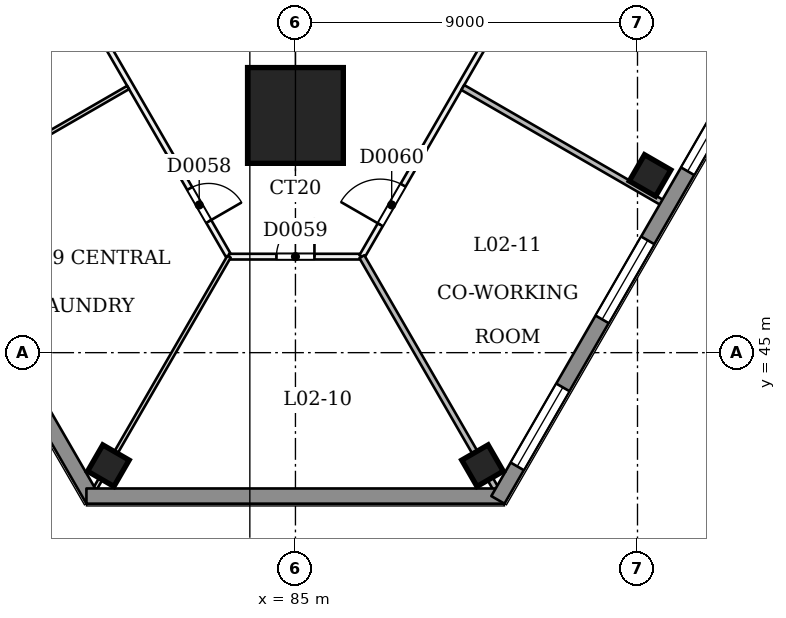
"""IFC4 building model, lengths in metres.
Left out: names, types, materials, properties, quantities, classifications, styles, units other than length and angle.
Written with IfcOpenShell. Run it as: python <this file> out.ifc"""

import sys

from ifc_helpers import new_model, si_unit, direction, frame, frame_2d, origin, origin_2d, place, context, subcontext, project, spatial, rectangle, extrude, element, fill, save


model = new_model("IFC4")
c1 = context("Model", 3, precision=1e-05, world=origin(), true_north=direction((0.0, 1.0)))
c2 = subcontext(c1, "Body", "Model", "MODEL_VIEW")
j1 = project(units=[si_unit("LENGTHUNIT", "METRE"), si_unit("PLANEANGLEUNIT", "RADIAN")], contexts=[c1])
p1 = place(None, origin())
s1 = spatial("IfcSite", under=j1, at=p1, CompositionType="ELEMENT")
p2 = place(p1, origin())
s2 = spatial("IfcBuilding", under=s1, at=p2, CompositionType="ELEMENT")
p3 = place(p2, frame((0.0, 0.0, 13.5)))
s3 = spatial("IfcBuildingStorey", under=s2, at=p3, CompositionType="ELEMENT", Elevation=13.5)
p4 = place(p3, frame((85.0, 51.171, 0.0), z_axis=(0.0, 0.058331497301, 0.998297268564), x_axis=(-1.0, 0.0, 0.0)))
e1 = element("IfcColumn", 1, at=p4, inside=s3, PredefinedType="COLUMN", context=c2, shape_type="SweptSolid", body=[
    extrude(rectangle(XDim=2.52, YDim=2.52, at=origin_2d()), origin(), (0.0, 0.0, 1.0), 4.508),
])
for number, where, z_axis, x_axis in (
    (2, (80.077, 42.026, 0.0), (0.0, 0.0, 1.0), (0.5, 0.866, 0.0)),
    (3, (89.923, 42.026, 0.0), (0.0, 0.0, 1.0), (0.866, 0.5, 0.0)),
    (4, (94.331, 49.662, 0.0), (0.0, 0.0, 1.0), (0.5, 0.866, 0.0)),
):
    element("IfcColumn", number, at=place(p3, frame(where, z_axis=z_axis, x_axis=x_axis)), inside=s3, PredefinedType="COLUMN", context=c2, shape_type="SweptSolid", body=[
        extrude(rectangle(XDim=0.8, YDim=0.8, at=origin_2d()), origin(), (0.0, 0.0, 1.0), 4.5),
    ])
p5 = place(p3, frame((55.57, 95.474, 0.0), z_axis=(0.0, 0.0, 1.0), x_axis=(0.500000085768, -0.866025354266, 0.0)))
e5 = element("IfcWall", 5, at=p5, inside=s3, PredefinedType="PARTITIONING", context=c2, shape_type="SweptSolid", body=[
    extrude(rectangle(XDim=55.365, YDim=0.15, at=frame_2d((27.682, 0.0))), origin(), (0.0, 0.0, 1.0), 4.05),
])
p6 = place(p5, frame((6.832, 0.0, 0.0)))
e6 = element("IfcOpeningElement", 6, at=p6, cuts=e5, PredefinedType="OPENING", context=c2, shape_type="SweptSolid", body=[
    extrude(rectangle(XDim=1.2, YDim=2.1, at=frame_2d((0.6, 1.05))), frame((0.0, 0.085, 0.0), z_axis=(0.0, -1.0, 0.0), x_axis=(1.0, 0.0, 0.0)), (0.0, 0.0, 1.0), 0.171),
])
p7 = place(p5, frame((14.626, 0.0, 0.0)))
e7 = element("IfcOpeningElement", 7, at=p7, cuts=e5, PredefinedType="OPENING", context=c2, shape_type="SweptSolid", body=[
    extrude(rectangle(XDim=0.9, YDim=2.1, at=frame_2d((0.45, 1.05))), frame((0.0, 0.085, 0.0), z_axis=(0.0, -1.0, 0.0), x_axis=(1.0, 0.0, 0.0)), (0.0, 0.0, 1.0), 0.171),
])
p8 = place(p5, frame((16.876, 0.0, 0.0)))
e8 = element("IfcOpeningElement", 8, at=p8, cuts=e5, PredefinedType="OPENING", context=c2, shape_type="SweptSolid", body=[
    extrude(rectangle(XDim=0.9, YDim=2.1, at=frame_2d((0.45, 1.05))), frame((0.0, 0.085, 0.0), z_axis=(0.0, -1.0, 0.0), x_axis=(1.0, 0.0, 0.0)), (0.0, 0.0, 1.0), 0.171),
])
p9 = place(p5, frame((24.832, 0.0, 0.0)))
e9 = element("IfcOpeningElement", 9, at=p9, cuts=e5, PredefinedType="OPENING", context=c2, shape_type="SweptSolid", body=[
    extrude(rectangle(XDim=1.2, YDim=2.1, at=frame_2d((0.6, 1.05))), frame((0.0, 0.085, 0.0), z_axis=(0.0, -1.0, 0.0), x_axis=(1.0, 0.0, 0.0)), (0.0, 0.0, 1.0), 0.171),
])
p10 = place(p5, frame((36.082, 0.0, 0.0)))
e10 = element("IfcOpeningElement", 10, at=p10, cuts=e5, PredefinedType="OPENING", context=c2, shape_type="SweptSolid", body=[
    extrude(rectangle(XDim=1.2, YDim=2.1, at=frame_2d((0.6, 1.05))), frame((0.0, 0.085, 0.0), z_axis=(0.0, -1.0, 0.0), x_axis=(1.0, 0.0, 0.0)), (0.0, 0.0, 1.0), 0.171),
])
p11 = place(p5, frame((45.082, 0.0, 0.0)))
e11 = element("IfcOpeningElement", 11, at=p11, cuts=e5, PredefinedType="OPENING", context=c2, shape_type="SweptSolid", body=[
    extrude(rectangle(XDim=1.2, YDim=2.1, at=frame_2d((0.6, 1.05))), frame((0.0, 0.085, 0.0), z_axis=(0.0, -1.0, 0.0), x_axis=(1.0, 0.0, 0.0)), (0.0, 0.0, 1.0), 0.171),
])
p12 = place(p5, frame((53.295, 0.0, 0.0)))
e12 = element("IfcOpeningElement", 12, at=p12, cuts=e5, PredefinedType="OPENING", context=c2, shape_type="SweptSolid", body=[
    extrude(rectangle(XDim=1.0, YDim=2.1, at=frame_2d((0.5, 1.05))), frame((0.0, 0.085, 0.0), z_axis=(0.0, -1.0, 0.0), x_axis=(1.0, 0.0, 0.0)), (0.0, 0.0, 1.0), 0.171),
])
p13 = place(p3, frame((83.253, 47.526, 0.0), z_axis=(0.0, 0.0, 1.0), x_axis=(1.0, 0.0, 0.0)))
e13 = element("IfcWall", 13, at=p13, inside=s3, PredefinedType="PARTITIONING", context=c2, shape_type="SweptSolid", body=[
    extrude(rectangle(XDim=3.495, YDim=0.15, at=frame_2d((1.747, 0.0))), origin(), (0.0, 0.0, 1.0), 4.05),
])
p14 = place(p13, frame((1.247, 0.0, 0.0)))
e14 = element("IfcOpeningElement", 14, at=p14, cuts=e13, PredefinedType="OPENING", context=c2, shape_type="SweptSolid", body=[
    extrude(rectangle(XDim=1.0, YDim=2.1, at=frame_2d((0.5, 1.05))), frame((0.0, 0.085, 0.0), z_axis=(0.0, -1.0, 0.0), x_axis=(1.0, 0.0, 0.0)), (0.0, 0.0, 1.0), 0.171),
])
p15 = place(p3, frame((86.747, 47.526, 0.0), z_axis=(0.0, 0.0, 1.0), x_axis=(0.500000085768, 0.866025354266, 0.0)))
e15 = element("IfcWall", 15, at=p15, inside=s3, PredefinedType="PARTITIONING", context=c2, shape_type="SweptSolid", body=[
    extrude(rectangle(XDim=55.365, YDim=0.15, at=frame_2d((27.682, 0.0))), origin(), (0.0, 0.0, 1.0), 4.05),
])
p16 = place(p15, frame((0.97, 0.0, 0.0)))
e16 = element("IfcOpeningElement", 16, at=p16, cuts=e15, PredefinedType="OPENING", context=c2, shape_type="SweptSolid", body=[
    extrude(rectangle(XDim=1.2, YDim=2.1, at=frame_2d((0.6, 1.05))), frame((0.0, 0.085, 0.0), z_axis=(0.0, -1.0, 0.0), x_axis=(1.0, 0.0, 0.0)), (0.0, 0.0, 1.0), 0.171),
])
p17 = place(p15, frame((11.332, 0.0, 0.0)))
e17 = element("IfcOpeningElement", 17, at=p17, cuts=e15, PredefinedType="OPENING", context=c2, shape_type="SweptSolid", body=[
    extrude(rectangle(XDim=1.2, YDim=2.1, at=frame_2d((0.6, 1.05))), frame((0.0, 0.085, 0.0), z_axis=(0.0, -1.0, 0.0), x_axis=(1.0, 0.0, 0.0)), (0.0, 0.0, 1.0), 0.171),
])
p18 = place(p15, frame((29.332, 0.0, 0.0)))
e18 = element("IfcOpeningElement", 18, at=p18, cuts=e15, PredefinedType="OPENING", context=c2, shape_type="SweptSolid", body=[
    extrude(rectangle(XDim=1.2, YDim=2.1, at=frame_2d((0.6, 1.05))), frame((0.0, 0.085, 0.0), z_axis=(0.0, -1.0, 0.0), x_axis=(1.0, 0.0, 0.0)), (0.0, 0.0, 1.0), 0.171),
])
p19 = place(p15, frame((42.132, 0.0, 0.0)))
e19 = element("IfcOpeningElement", 19, at=p19, cuts=e15, PredefinedType="OPENING", context=c2, shape_type="SweptSolid", body=[
    extrude(rectangle(XDim=1.2, YDim=2.1, at=frame_2d((0.6, 1.05))), frame((0.0, 0.085, 0.0), z_axis=(0.0, -1.0, 0.0), x_axis=(1.0, 0.0, 0.0)), (0.0, 0.0, 1.0), 0.171),
])
p20 = place(p15, frame((46.569, 0.0, 0.0)))
e20 = element("IfcOpeningElement", 20, at=p20, cuts=e15, PredefinedType="OPENING", context=c2, shape_type="SweptSolid", body=[
    extrude(rectangle(XDim=1.0, YDim=2.1, at=frame_2d((0.5, 1.05))), frame((0.0, 0.085, 0.0), z_axis=(0.0, -1.0, 0.0), x_axis=(1.0, 0.0, 0.0)), (0.0, 0.0, 1.0), 0.171),
])
p21 = place(p15, frame((48.819, 0.0, 0.0)))
e21 = element("IfcOpeningElement", 21, at=p21, cuts=e15, PredefinedType="OPENING", context=c2, shape_type="SweptSolid", body=[
    extrude(rectangle(XDim=1.0, YDim=2.1, at=frame_2d((0.5, 1.05))), frame((0.0, 0.085, 0.0), z_axis=(0.0, -1.0, 0.0), x_axis=(1.0, 0.0, 0.0)), (0.0, 0.0, 1.0), 0.171),
])
p22 = place(p15, frame((51.837, 0.0, 0.0)))
e22 = element("IfcOpeningElement", 22, at=p22, cuts=e15, PredefinedType="OPENING", context=c2, shape_type="SweptSolid", body=[
    extrude(rectangle(XDim=1.2, YDim=2.1, at=frame_2d((0.6, 1.05))), frame((0.0, 0.085, 0.0), z_axis=(0.0, -1.0, 0.0), x_axis=(1.0, 0.0, 0.0)), (0.0, 0.0, 1.0), 0.171),
])
p23 = place(p3, frame((75.119, 48.814, 0.0), z_axis=(0.0, 0.0, 1.0), x_axis=(0.866025537322, 0.499999768706, 0.0)))
e23 = element("IfcWall", 23, at=p23, inside=s3, PredefinedType="PARTITIONING", context=c2, shape_type="SweptSolid", body=[
    extrude(rectangle(XDim=6.325, YDim=0.1, at=frame_2d((3.163, 0.0))), origin(), (0.0, 0.0, 1.0), 4.05),
])
p24 = place(p3, frame((79.558, 41.126, 0.0), z_axis=(0.0, 0.0, 1.0), x_axis=(0.499969342782, 0.866043103014, 0.0)))
e24 = element("IfcWall", 24, at=p24, inside=s3, PredefinedType="PARTITIONING", context=c2, shape_type="SweptSolid", body=[
    extrude(rectangle(XDim=7.39, YDim=0.1, at=frame_2d((3.695, 0.0))), origin(), (0.0, 0.0, 1.0), 4.05),
])
p25 = place(p3, frame((90.442, 41.126, 0.0), z_axis=(0.0, 0.0, 1.0), x_axis=(-0.499994120305, 0.866028798401, 0.0)))
e25 = element("IfcWall", 25, at=p25, inside=s3, PredefinedType="PARTITIONING", context=c2, shape_type="SweptSolid", body=[
    extrude(rectangle(XDim=7.39, YDim=0.15, at=frame_2d((3.695, 0.0))), origin(), (0.0, 0.0, 1.0), 4.05),
])
p26 = place(p3, frame((94.881, 48.814, 0.0), z_axis=(0.0, 0.0, 1.0), x_axis=(-0.866042250622, 0.499970819286, 0.0)))
e26 = element("IfcWall", 26, at=p26, inside=s3, PredefinedType="PARTITIONING", context=c2, shape_type="SweptSolid", body=[
    extrude(rectangle(XDim=6.325, YDim=0.15, at=frame_2d((3.163, 0.0))), origin(), (0.0, 0.0, 1.0), 4.05),
])
p27 = place(p3, frame((79.673, 41.126, 0.0), z_axis=(0.0, 0.0, 1.0), x_axis=(-0.499997306052, 0.866026959131, 0.0)))
e27 = element("IfcWall", 27, at=p27, inside=s3, PredefinedType="SOLIDWALL", context=c2, shape_type="SweptSolid", body=[
    extrude(rectangle(XDim=62.87, YDim=0.4, at=frame_2d((31.435, 0.0))), origin(), (0.0, 0.0, 1.0), 4.05),
])
p28 = place(p27, frame((54.986, 0.0, 0.9)))
e28 = element("IfcOpeningElement", 28, at=p28, cuts=e27, PredefinedType="OPENING", context=c2, shape_type="SweptSolid", body=[
    extrude(rectangle(XDim=2.4, YDim=1.5, at=frame_2d((1.2, 0.75))), frame((0.0, 0.21, 0.0), z_axis=(0.0, -1.0, 0.0), x_axis=(1.0, 0.0, 0.0)), (0.0, 0.0, 1.0), 0.421),
])
p29 = place(p27, frame((50.486, 0.0, 0.9)))
e29 = element("IfcOpeningElement", 29, at=p29, cuts=e27, PredefinedType="OPENING", context=c2, shape_type="SweptSolid", body=[
    extrude(rectangle(XDim=2.4, YDim=1.5, at=frame_2d((1.2, 0.75))), frame((0.0, 0.21, 0.0), z_axis=(0.0, -1.0, 0.0), x_axis=(1.0, 0.0, 0.0)), (0.0, 0.0, 1.0), 0.421),
])
p30 = place(p27, frame((45.986, 0.0, 0.9)))
e30 = element("IfcOpeningElement", 30, at=p30, cuts=e27, PredefinedType="OPENING", context=c2, shape_type="SweptSolid", body=[
    extrude(rectangle(XDim=2.4, YDim=1.5, at=frame_2d((1.2, 0.75))), frame((0.0, 0.21, 0.0), z_axis=(0.0, -1.0, 0.0), x_axis=(1.0, 0.0, 0.0)), (0.0, 0.0, 1.0), 0.421),
])
p31 = place(p27, frame((32.486, 0.0, 0.9)))
e31 = element("IfcOpeningElement", 31, at=p31, cuts=e27, PredefinedType="OPENING", context=c2, shape_type="SweptSolid", body=[
    extrude(rectangle(XDim=2.4, YDim=1.5, at=frame_2d((1.2, 0.75))), frame((0.0, 0.21, 0.0), z_axis=(0.0, -1.0, 0.0), x_axis=(1.0, 0.0, 0.0)), (0.0, 0.0, 1.0), 0.421),
])
p32 = place(p27, frame((27.986, 0.0, 0.9)))
e32 = element("IfcOpeningElement", 32, at=p32, cuts=e27, PredefinedType="OPENING", context=c2, shape_type="SweptSolid", body=[
    extrude(rectangle(XDim=2.4, YDim=1.5, at=frame_2d((1.2, 0.75))), frame((0.0, 0.21, 0.0), z_axis=(0.0, -1.0, 0.0), x_axis=(1.0, 0.0, 0.0)), (0.0, 0.0, 1.0), 0.421),
])
p33 = place(p27, frame((23.486, 0.0, 0.9)))
e33 = element("IfcOpeningElement", 33, at=p33, cuts=e27, PredefinedType="OPENING", context=c2, shape_type="SweptSolid", body=[
    extrude(rectangle(XDim=2.4, YDim=1.5, at=frame_2d((1.2, 0.75))), frame((0.0, 0.21, 0.0), z_axis=(0.0, -1.0, 0.0), x_axis=(1.0, 0.0, 0.0)), (0.0, 0.0, 1.0), 0.421),
])
p34 = place(p27, frame((18.986, 0.0, 0.9)))
e34 = element("IfcOpeningElement", 34, at=p34, cuts=e27, PredefinedType="OPENING", context=c2, shape_type="SweptSolid", body=[
    extrude(rectangle(XDim=2.4, YDim=1.5, at=frame_2d((1.2, 0.75))), frame((0.0, 0.21, 0.0), z_axis=(0.0, -1.0, 0.0), x_axis=(1.0, 0.0, 0.0)), (0.0, 0.0, 1.0), 0.421),
])
p35 = place(p27, frame((14.486, 0.0, 0.9)))
e35 = element("IfcOpeningElement", 35, at=p35, cuts=e27, PredefinedType="OPENING", context=c2, shape_type="SweptSolid", body=[
    extrude(rectangle(XDim=2.4, YDim=1.5, at=frame_2d((1.2, 0.75))), frame((0.0, 0.21, 0.0), z_axis=(0.0, -1.0, 0.0), x_axis=(1.0, 0.0, 0.0)), (0.0, 0.0, 1.0), 0.421),
])
p36 = place(p3, frame((90.5, 41.226, 0.0), z_axis=(0.0, 0.0, 1.0), x_axis=(-1.0, 0.0, 0.0)))
e36 = element("IfcWall", 36, at=p36, inside=s3, PredefinedType="SOLIDWALL", context=c2, shape_type="SweptSolid", body=[
    extrude(rectangle(XDim=11.0, YDim=0.4, at=frame_2d((5.5, 0.0))), origin(), (0.0, 0.0, 1.0), 4.05),
])
p37 = place(p3, frame((121.762, 95.574, 0.0), z_axis=(0.0, 0.0, 1.0), x_axis=(-0.499997306052, -0.866026959131, 0.0)))
e37 = element("IfcWall", 37, at=p37, inside=s3, PredefinedType="SOLIDWALL", context=c2, shape_type="SweptSolid", body=[
    extrude(rectangle(XDim=62.87, YDim=0.4, at=frame_2d((31.435, 0.0))), origin(), (0.0, 0.0, 1.0), 4.05),
])
p38 = place(p37, frame((59.452, 0.0, 0.9)))
e38 = element("IfcOpeningElement", 38, at=p38, cuts=e37, PredefinedType="OPENING", context=c2, shape_type="SweptSolid", body=[
    extrude(rectangle(XDim=2.4, YDim=1.5, at=frame_2d((1.2, 0.75))), frame((0.0, 0.21, 0.0), z_axis=(0.0, -1.0, 0.0), x_axis=(1.0, 0.0, 0.0)), (0.0, 0.0, 1.0), 0.421),
])
p39 = place(p37, frame((54.986, 0.0, 0.9)))
e39 = element("IfcOpeningElement", 39, at=p39, cuts=e37, PredefinedType="OPENING", context=c2, shape_type="SweptSolid", body=[
    extrude(rectangle(XDim=2.4, YDim=1.5, at=frame_2d((1.2, 0.75))), frame((0.0, 0.21, 0.0), z_axis=(0.0, -1.0, 0.0), x_axis=(1.0, 0.0, 0.0)), (0.0, 0.0, 1.0), 0.421),
])
p40 = place(p37, frame((50.486, 0.0, 0.9)))
e40 = element("IfcOpeningElement", 40, at=p40, cuts=e37, PredefinedType="OPENING", context=c2, shape_type="SweptSolid", body=[
    extrude(rectangle(XDim=2.4, YDim=1.5, at=frame_2d((1.2, 0.75))), frame((0.0, 0.21, 0.0), z_axis=(0.0, -1.0, 0.0), x_axis=(1.0, 0.0, 0.0)), (0.0, 0.0, 1.0), 0.421),
])
p41 = place(p37, frame((45.986, 0.0, 0.9)))
e41 = element("IfcOpeningElement", 41, at=p41, cuts=e37, PredefinedType="OPENING", context=c2, shape_type="SweptSolid", body=[
    extrude(rectangle(XDim=2.4, YDim=1.5, at=frame_2d((1.2, 0.75))), frame((0.0, 0.21, 0.0), z_axis=(0.0, -1.0, 0.0), x_axis=(1.0, 0.0, 0.0)), (0.0, 0.0, 1.0), 0.421),
])
p42 = place(p37, frame((41.486, 0.0, 0.9)))
e42 = element("IfcOpeningElement", 42, at=p42, cuts=e37, PredefinedType="OPENING", context=c2, shape_type="SweptSolid", body=[
    extrude(rectangle(XDim=2.4, YDim=1.5, at=frame_2d((1.2, 0.75))), frame((0.0, 0.21, 0.0), z_axis=(0.0, -1.0, 0.0), x_axis=(1.0, 0.0, 0.0)), (0.0, 0.0, 1.0), 0.421),
])
p43 = place(p37, frame((36.986, 0.0, 0.9)))
e43 = element("IfcOpeningElement", 43, at=p43, cuts=e37, PredefinedType="OPENING", context=c2, shape_type="SweptSolid", body=[
    extrude(rectangle(XDim=2.4, YDim=1.5, at=frame_2d((1.2, 0.75))), frame((0.0, 0.21, 0.0), z_axis=(0.0, -1.0, 0.0), x_axis=(1.0, 0.0, 0.0)), (0.0, 0.0, 1.0), 0.421),
])
p44 = place(p37, frame((23.486, 0.0, 0.9)))
e44 = element("IfcOpeningElement", 44, at=p44, cuts=e37, PredefinedType="OPENING", context=c2, shape_type="SweptSolid", body=[
    extrude(rectangle(XDim=2.4, YDim=1.5, at=frame_2d((1.2, 0.75))), frame((0.0, 0.21, 0.0), z_axis=(0.0, -1.0, 0.0), x_axis=(1.0, 0.0, 0.0)), (0.0, 0.0, 1.0), 0.421),
])
p45 = place(p37, frame((18.986, 0.0, 0.9)))
e45 = element("IfcOpeningElement", 45, at=p45, cuts=e37, PredefinedType="OPENING", context=c2, shape_type="SweptSolid", body=[
    extrude(rectangle(XDim=2.4, YDim=1.5, at=frame_2d((1.2, 0.75))), frame((0.0, 0.21, 0.0), z_axis=(0.0, -1.0, 0.0), x_axis=(1.0, 0.0, 0.0)), (0.0, 0.0, 1.0), 0.421),
])
p46 = place(p37, frame((14.486, 0.0, 0.9)))
e46 = element("IfcOpeningElement", 46, at=p46, cuts=e37, PredefinedType="OPENING", context=c2, shape_type="SweptSolid", body=[
    extrude(rectangle(XDim=2.4, YDim=1.5, at=frame_2d((1.2, 0.75))), frame((0.0, 0.21, 0.0), z_axis=(0.0, -1.0, 0.0), x_axis=(1.0, 0.0, 0.0)), (0.0, 0.0, 1.0), 0.421),
])
p47 = place(p37, frame((5.486, 0.0, 0.9)))
e47 = element("IfcOpeningElement", 47, at=p47, cuts=e37, PredefinedType="OPENING", context=c2, shape_type="SweptSolid", body=[
    extrude(rectangle(XDim=2.4, YDim=1.5, at=frame_2d((1.2, 0.75))), frame((0.0, 0.21, 0.0), z_axis=(0.0, -1.0, 0.0), x_axis=(1.0, 0.0, 0.0)), (0.0, 0.0, 1.0), 0.421),
])
p48 = place(p37, frame((1.018, 0.0, 0.9)))
e48 = element("IfcOpeningElement", 48, at=p48, cuts=e37, PredefinedType="OPENING", context=c2, shape_type="SweptSolid", body=[
    extrude(rectangle(XDim=2.4, YDim=1.5, at=frame_2d((1.2, 0.75))), frame((0.0, 0.21, 0.0), z_axis=(0.0, -1.0, 0.0), x_axis=(1.0, 0.0, 0.0)), (0.0, 0.0, 1.0), 0.421),
])
p49 = place(p12, origin())
e49 = element("IfcDoor", 49, at=p49, inside=s3, OperationType="SINGLE_SWING_RIGHT", PredefinedType="NOTDEFINED", context=c2, shape_type="SweptSolid", body=[
    extrude(rectangle(XDim=1.0, YDim=2.1, at=frame_2d((0.5, 1.05))), frame((0.0, 0.025, 0.0), z_axis=(0.0, -1.0, 0.0), x_axis=(1.0, 0.0, 0.0)), (0.0, 0.0, 1.0), 0.05),
])
fill(e12, e49)
p50 = place(p14, origin())
e50 = element("IfcDoor", 50, at=p50, inside=s3, OperationType="SINGLE_SWING_RIGHT", PredefinedType="NOTDEFINED", context=c2, shape_type="SweptSolid", body=[
    extrude(rectangle(XDim=1.0, YDim=2.1, at=frame_2d((0.5, 1.05))), frame((0.0, 0.025, 0.0), z_axis=(0.0, -1.0, 0.0), x_axis=(1.0, 0.0, 0.0)), (0.0, 0.0, 1.0), 0.05),
])
fill(e14, e50)
p51 = place(p16, origin())
e51 = element("IfcDoor", 51, at=p51, inside=s3, OperationType="SINGLE_SWING_LEFT", PredefinedType="NOTDEFINED", context=c2, shape_type="SweptSolid", body=[
    extrude(rectangle(XDim=1.2, YDim=2.1, at=frame_2d((0.6, 1.05))), frame((0.0, 0.025, 0.0), z_axis=(0.0, -1.0, 0.0), x_axis=(1.0, 0.0, 0.0)), (0.0, 0.0, 1.0), 0.05),
])
fill(e16, e51)
p52 = place(p38, origin())
e52 = element("IfcWindow", 52, at=p52, inside=s3, PartitioningType="SINGLE_PANEL", PredefinedType="WINDOW", context=c2, shape_type="SweptSolid", body=[
    extrude(rectangle(XDim=2.4, YDim=1.5, at=frame_2d((1.2, 0.75))), frame((0.0, 0.03, 0.0), z_axis=(0.0, -1.0, 0.0), x_axis=(1.0, 0.0, 0.0)), (0.0, 0.0, 1.0), 0.06),
])
fill(e38, e52)
p53 = place(p39, origin())
e53 = element("IfcWindow", 53, at=p53, inside=s3, PartitioningType="SINGLE_PANEL", PredefinedType="WINDOW", context=c2, shape_type="SweptSolid", body=[
    extrude(rectangle(XDim=2.4, YDim=1.5, at=frame_2d((1.2, 0.75))), frame((0.0, 0.03, 0.0), z_axis=(0.0, -1.0, 0.0), x_axis=(1.0, 0.0, 0.0)), (0.0, 0.0, 1.0), 0.06),
])
fill(e39, e53)
p54 = place(p40, origin())
e54 = element("IfcWindow", 54, at=p54, inside=s3, PartitioningType="SINGLE_PANEL", PredefinedType="WINDOW", context=c2, shape_type="SweptSolid", body=[
    extrude(rectangle(XDim=2.4, YDim=1.5, at=frame_2d((1.2, 0.75))), frame((0.0, 0.03, 0.0), z_axis=(0.0, -1.0, 0.0), x_axis=(1.0, 0.0, 0.0)), (0.0, 0.0, 1.0), 0.06),
])
fill(e40, e54)
save(model, sys.argv[1])
